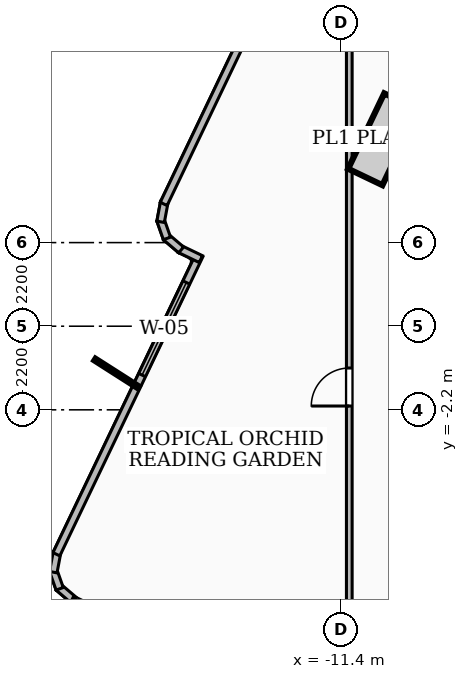
"""IFC4 building model, lengths in metres.
Left out: names, types, materials, properties, quantities, classifications, styles, units other than length and angle.
Written with IfcOpenShell. Run it as: python <this file> out.ifc"""

import sys

from ifc_helpers import new_model, si_unit, direction, frame, frame_2d, origin, place, context, subcontext, project, spatial, rectangle, extrude, element, fill, save


model = new_model("IFC4")
c1 = context("Model", 3, precision=1e-05, world=origin(), true_north=direction((0.0, 1.0)))
c2 = subcontext(c1, "Body", "Model", "MODEL_VIEW")
j1 = project(units=[si_unit("LENGTHUNIT", "METRE"), si_unit("PLANEANGLEUNIT", "RADIAN")], contexts=[c1])
p1 = place(None, origin())
s1 = spatial("IfcSite", under=j1, at=p1, CompositionType="ELEMENT")
p2 = place(p1, origin())
s2 = spatial("IfcBuilding", under=s1, at=p2, CompositionType="ELEMENT")
p3 = place(p2, frame((0.0, 0.0, 293.4)))
s3 = spatial("IfcBuildingStorey", under=s2, at=p3, CompositionType="ELEMENT", Elevation=293.4)
p4 = place(p3, frame((-18.428, -7.211, 0.0), z_axis=(0.0, 0.0, 1.0), x_axis=(-0.759943910462, 0.649988656018, 0.0)))
e1 = element("IfcWall", 1, at=p4, inside=s3, PredefinedType="SOLIDWALL", context=c2, shape_type="SweptSolid", body=[
    extrude(rectangle(XDim=0.526, YDim=0.2, at=frame_2d((0.263, 0.0))), origin(), (0.0, 0.0, 1.0), 3.84),
])
p5 = place(p3, frame((-18.801, -6.909, 0.0), z_axis=(0.0, 0.0, 1.0), x_axis=(-0.331828095813, 0.943339872384, 0.0)))
e2 = element("IfcWall", 2, at=p5, inside=s3, PredefinedType="SOLIDWALL", context=c2, shape_type="SweptSolid", body=[
    extrude(rectangle(XDim=0.515, YDim=0.2, at=frame_2d((0.258, 0.0))), origin(), (0.0, 0.0, 1.0), 3.84),
])
p6 = place(p3, frame((-18.969, -6.472, 0.0), z_axis=(0.0, 0.0, 1.0), x_axis=(0.185012762142, 0.982736118113, 0.0)))
e3 = element("IfcWall", 3, at=p6, inside=s3, PredefinedType="SOLIDWALL", context=c2, shape_type="SweptSolid", body=[
    extrude(rectangle(XDim=0.529, YDim=0.2, at=frame_2d((0.265, 0.0))), origin(), (0.0, 0.0, 1.0), 3.84),
])
p7 = place(p3, frame((-18.887, -6.0, 0.0), z_axis=(0.0, 0.0, 1.0), x_axis=(0.4314545073, 0.902134695115, 0.0)))
e4 = element("IfcWall", 4, at=p7, inside=s3, PredefinedType="SOLIDWALL", context=c2, shape_type="SweptSolid", body=[
    extrude(rectangle(XDim=8.726, YDim=0.2, at=frame_2d((4.363, 0.0))), origin(), (0.0, 0.0, 1.0), 3.84),
])
p8 = place(p7, frame((5.226, 0.0, 0.85)))
e5 = element("IfcOpeningElement", 5, at=p8, cuts=e4, PredefinedType="OPENING", context=c2, shape_type="SweptSolid", body=[
    extrude(rectangle(XDim=2.7, YDim=1.85, at=frame_2d((1.35, 0.925))), frame((0.0, 0.11, 0.0), z_axis=(0.0, -1.0, 0.0), x_axis=(1.0, 0.0, 0.0)), (0.0, 0.0, 1.0), 0.22),
])
p9 = place(p3, frame((-15.085, 1.765, 0.0), z_axis=(0.0, 0.0, 1.0), x_axis=(-0.901069775832, 0.433674139282, 0.0)))
e6 = element("IfcWall", 6, at=p9, inside=s3, PredefinedType="SOLIDWALL", context=c2, shape_type="SweptSolid", body=[
    extrude(rectangle(XDim=0.623, YDim=0.2, at=frame_2d((0.311, 0.0))), origin(), (0.0, 0.0, 1.0), 3.84),
])
p10 = place(p3, frame((-15.604, 2.008, 0.0), z_axis=(0.0, 0.0, 1.0), x_axis=(-0.760726296162, 0.649072802024, 0.0)))
e7 = element("IfcWall", 7, at=p10, inside=s3, PredefinedType="SOLIDWALL", context=c2, shape_type="SweptSolid", body=[
    extrude(rectangle(XDim=0.527, YDim=0.2, at=frame_2d((0.263, 0.0))), origin(), (0.0, 0.0, 1.0), 3.84),
])
p11 = place(p3, frame((-15.978, 2.31, 0.0), z_axis=(0.0, 0.0, 1.0), x_axis=(-0.330139130112, 0.943932282936, 0.0)))
e8 = element("IfcWall", 8, at=p11, inside=s3, PredefinedType="SOLIDWALL", context=c2, shape_type="SweptSolid", body=[
    extrude(rectangle(XDim=0.515, YDim=0.2, at=frame_2d((0.257, 0.0))), origin(), (0.0, 0.0, 1.0), 3.84),
])
p12 = place(p3, frame((-16.145, 2.747, 0.0), z_axis=(0.0, 0.0, 1.0), x_axis=(0.183562644201, 0.983008014033, 0.0)))
e9 = element("IfcWall", 9, at=p12, inside=s3, PredefinedType="SOLIDWALL", context=c2, shape_type="SweptSolid", body=[
    extrude(rectangle(XDim=0.528, YDim=0.2, at=frame_2d((0.264, 0.0))), origin(), (0.0, 0.0, 1.0), 3.84),
])
p13 = place(p3, frame((-16.064, 3.218, 0.0), z_axis=(0.0, 0.0, 1.0), x_axis=(0.431506971387, 0.902109601791, 0.0)))
e10 = element("IfcWall", 10, at=p13, inside=s3, PredefinedType="SOLIDWALL", context=c2, shape_type="SweptSolid", body=[
    extrude(rectangle(XDim=8.056, YDim=0.2, at=frame_2d((4.028, 0.0))), origin(), (0.0, 0.0, 1.0), 3.84),
])
p14 = place(p13, frame((5.383, 0.0, 0.85)))
e11 = element("IfcOpeningElement", 11, at=p14, cuts=e10, PredefinedType="OPENING", context=c2, shape_type="SweptSolid", body=[
    extrude(rectangle(XDim=1.8, YDim=1.6, at=frame_2d((0.9, 0.8))), frame((0.0, 0.11, 0.0), z_axis=(0.0, -1.0, 0.0), x_axis=(1.0, 0.0, 0.0)), (0.0, 0.0, 1.0), 0.22),
])
p15 = place(p3, frame((-11.18, -10.599, 0.0), z_axis=(0.0, 0.0, 1.0), x_axis=(0.0, 1.0, 0.0)))
e12 = element("IfcWall", 12, at=p15, inside=s3, PredefinedType="PARTITIONING", context=c2, shape_type="SweptSolid", body=[
    extrude(rectangle(XDim=21.322, YDim=0.15, at=frame_2d((10.661, 0.0))), origin(), (0.0, 0.0, 1.0), 3.84),
])
p16 = place(p15, frame((8.499, 0.0, 0.0)))
e13 = element("IfcOpeningElement", 13, at=p16, cuts=e12, PredefinedType="OPENING", context=c2, shape_type="SweptSolid", body=[
    extrude(rectangle(XDim=1.0, YDim=2.1, at=frame_2d((0.5, 1.05))), frame((0.0, 0.085, 0.0), z_axis=(0.0, -1.0, 0.0), x_axis=(1.0, 0.0, 0.0)), (0.0, 0.0, 1.0), 0.17),
])
p17 = place(p8, origin())
e14 = element("IfcWindow", 14, at=p17, inside=s3, PartitioningType="SINGLE_PANEL", PredefinedType="WINDOW", context=c2, shape_type="SweptSolid", body=[
    extrude(rectangle(XDim=2.7, YDim=1.85, at=frame_2d((1.35, 0.925))), frame((0.0, 0.03, 0.0), z_axis=(0.0, -1.0, 0.0), x_axis=(1.0, 0.0, 0.0)), (0.0, 0.0, 1.0), 0.06),
])
fill(e5, e14)
p18 = place(p16, origin())
e15 = element("IfcDoor", 15, at=p18, inside=s3, OperationType="SINGLE_SWING_LEFT", PredefinedType="DOOR", context=c2, shape_type="SweptSolid", body=[
    extrude(rectangle(XDim=1.0, YDim=2.1, at=frame_2d((0.5, 1.05))), frame((0.0, 0.025, 0.0), z_axis=(0.0, -1.0, 0.0), x_axis=(1.0, 0.0, 0.0)), (0.0, 0.0, 1.0), 0.05),
])
fill(e13, e15)
save(model, sys.argv[1])
